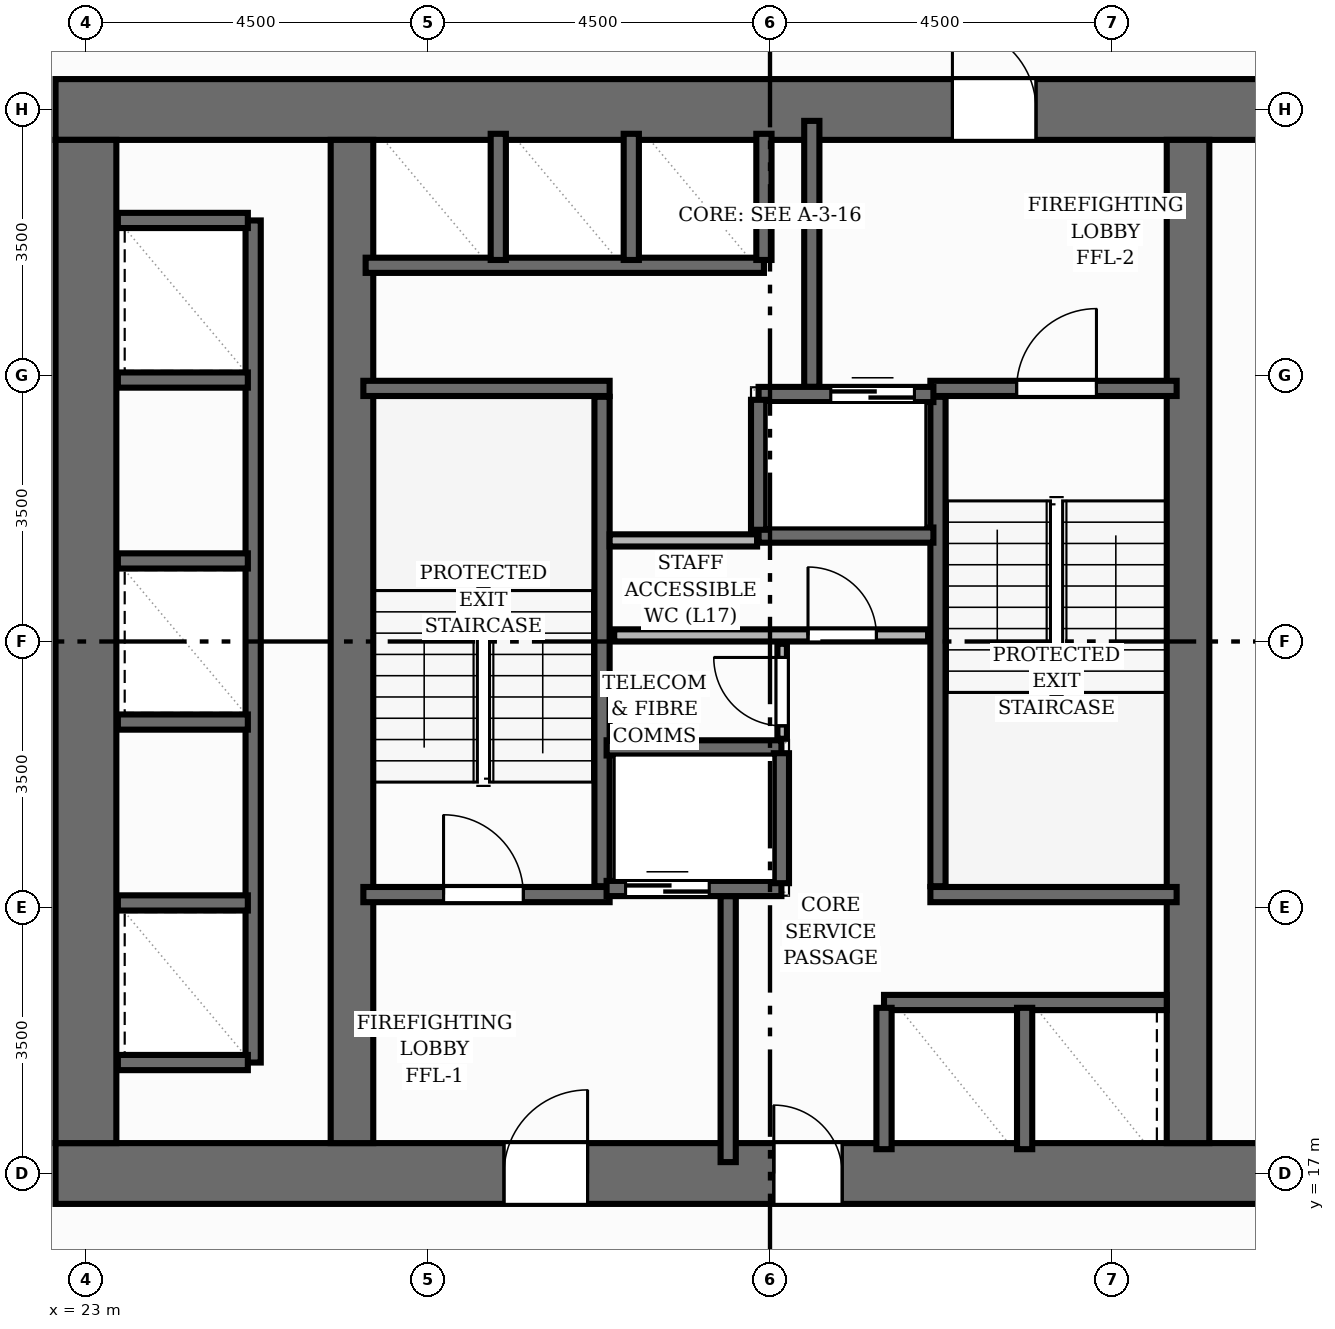
"""IFC4 building model, lengths in metres.
Left out: names, types, materials, properties, quantities, classifications, styles, units other than length and angle.
Written with IfcOpenShell. Run it as: python <this file> out.ifc"""

import sys

from ifc_helpers import new_model, si_unit, direction, frame, frame_2d, origin, place, context, subcontext, project, spatial, rectangle, extrude, element, fill, save


model = new_model("IFC4")
c1 = context("Model", 3, precision=1e-05, world=origin(), true_north=direction((0.0, 1.0)))
c2 = subcontext(c1, "Body", "Model", "MODEL_VIEW")
j1 = project(units=[si_unit("LENGTHUNIT", "METRE"), si_unit("PLANEANGLEUNIT", "RADIAN")], contexts=[c1])
p1 = place(None, origin())
s1 = spatial("IfcSite", under=j1, at=p1, CompositionType="ELEMENT")
p2 = place(p1, origin())
s2 = spatial("IfcBuilding", under=s1, at=p2, CompositionType="ELEMENT")
p3 = place(p2, frame((0.0, 0.0, 60.0)))
s3 = spatial("IfcBuildingStorey", under=s2, at=p3, CompositionType="ELEMENT", Elevation=60.0)
p4 = place(p3, frame((22.6, 17.0, 0.0), z_axis=(0.0, 0.0, 1.0), x_axis=(1.0, 0.0, 0.0)))
e1 = element("IfcWall", 1, at=p4, inside=s3, PredefinedType="SHEAR", context=c2, shape_type="SweptSolid", body=[
    extrude(rectangle(XDim=18.8, YDim=0.8, at=frame_2d((9.4, 0.0))), origin(), (0.0, 0.0, 1.0), 3.2),
])
p5 = place(p4, frame((5.9, 0.0, 0.0)))
e2 = element("IfcOpeningElement", 2, at=p5, cuts=e1, PredefinedType="OPENING", context=c2, shape_type="SweptSolid", body=[
    extrude(rectangle(XDim=1.1, YDim=2.15, at=frame_2d((0.55, 1.075))), frame((0.0, 0.41, 0.0), z_axis=(0.0, -1.0, 0.0), x_axis=(1.0, 0.0, 0.0)), (0.0, 0.0, 1.0), 0.82),
])
p6 = place(p4, frame((9.45, 0.0, 0.0)))
e3 = element("IfcOpeningElement", 3, at=p6, cuts=e1, PredefinedType="OPENING", context=c2, shape_type="SweptSolid", body=[
    extrude(rectangle(XDim=0.9, YDim=2.1, at=frame_2d((0.45, 1.05))), frame((0.0, 0.41, 0.0), z_axis=(0.0, -1.0, 0.0), x_axis=(1.0, 0.0, 0.0)), (0.0, 0.0, 1.0), 0.82),
])
p7 = place(p3, frame((22.6, 31.0, 0.0), z_axis=(0.0, 0.0, 1.0), x_axis=(1.0, 0.0, 0.0)))
e4 = element("IfcWall", 4, at=p7, inside=s3, PredefinedType="SHEAR", context=c2, shape_type="SweptSolid", body=[
    extrude(rectangle(XDim=18.8, YDim=0.8, at=frame_2d((9.4, 0.0))), origin(), (0.0, 0.0, 1.0), 3.2),
])
p8 = place(p7, frame((11.8, 0.0, 0.0)))
e5 = element("IfcOpeningElement", 5, at=p8, cuts=e4, PredefinedType="OPENING", context=c2, shape_type="SweptSolid", body=[
    extrude(rectangle(XDim=1.1, YDim=2.15, at=frame_2d((0.55, 1.075))), frame((0.0, 0.41, 0.0), z_axis=(0.0, -1.0, 0.0), x_axis=(1.0, 0.0, 0.0)), (0.0, 0.0, 1.0), 0.82),
])
p9 = place(p3, frame((23.0, 17.4, 0.0), z_axis=(0.0, 0.0, 1.0), x_axis=(0.0, 1.0, 0.0)))
e6 = element("IfcWall", 6, at=p9, inside=s3, PredefinedType="SHEAR", context=c2, shape_type="SweptSolid", body=[
    extrude(rectangle(XDim=13.2, YDim=0.8, at=frame_2d((6.6, 0.0))), origin(), (0.0, 0.0, 1.0), 3.2),
])
for number, where, z_axis, x_axis in (
    (7, (26.5, 17.4, 0.0), (0.0, 0.0, 1.0), (0.0, 1.0, 0.0)),
    (8, (37.5, 17.4, 0.0), (0.0, 0.0, 1.0), (0.0, 1.0, 0.0)),
):
    element("IfcWall", number, at=place(p3, frame(where, z_axis=z_axis, x_axis=x_axis)), inside=s3, PredefinedType="SHEAR", context=c2, shape_type="SweptSolid", body=[
        extrude(rectangle(XDim=13.2, YDim=0.56, at=frame_2d((6.6, 0.0))), origin(), (0.0, 0.0, 1.0), 3.2),
    ])
p10 = place(p3, frame((29.79, 20.78, 0.0), z_axis=(0.0, 0.0, 1.0), x_axis=(0.0, 1.0, 0.0)))
e9 = element("IfcWall", 9, at=p10, inside=s3, PredefinedType="SHEAR", context=c2, shape_type="SweptSolid", body=[
    extrude(rectangle(XDim=6.44, YDim=0.2, at=frame_2d((3.22, 0.0))), origin(), (0.0, 0.0, 1.0), 3.2),
])
p11 = place(p3, frame((26.65, 27.33, 0.0), z_axis=(0.0, 0.0, 1.0), x_axis=(1.0, 0.0, 0.0)))
e10 = element("IfcWall", 10, at=p11, inside=s3, PredefinedType="SHEAR", context=c2, shape_type="SweptSolid", body=[
    extrude(rectangle(XDim=3.24, YDim=0.2, at=frame_2d((1.62, 0.0))), origin(), (0.0, 0.0, 1.0), 3.2),
])
p12 = place(p3, frame((26.65, 20.67, 0.0), z_axis=(0.0, 0.0, 1.0), x_axis=(1.0, 0.0, 0.0)))
e11 = element("IfcWall", 11, at=p12, inside=s3, PredefinedType="SHEAR", context=c2, shape_type="SweptSolid", body=[
    extrude(rectangle(XDim=3.24, YDim=0.2, at=frame_2d((1.62, 0.0))), origin(), (0.0, 0.0, 1.0), 3.2),
])
p13 = place(p12, frame((1.055, 0.0, 0.0)))
e12 = element("IfcOpeningElement", 12, at=p13, cuts=e11, PredefinedType="OPENING", context=c2, shape_type="SweptSolid", body=[
    extrude(rectangle(XDim=1.05, YDim=2.15, at=frame_2d((0.525, 1.075))), frame((0.0, 0.11, 0.0), z_axis=(0.0, -1.0, 0.0), x_axis=(1.0, 0.0, 0.0)), (0.0, 0.0, 1.0), 0.22),
])
p14 = place(p3, frame((34.21, 20.78, 0.0), z_axis=(0.0, 0.0, 1.0), x_axis=(0.0, 1.0, 0.0)))
e13 = element("IfcWall", 13, at=p14, inside=s3, PredefinedType="SHEAR", context=c2, shape_type="SweptSolid", body=[
    extrude(rectangle(XDim=6.44, YDim=0.2, at=frame_2d((3.22, 0.0))), origin(), (0.0, 0.0, 1.0), 3.2),
])
p15 = place(p3, frame((34.11, 20.67, 0.0), z_axis=(0.0, 0.0, 1.0), x_axis=(1.0, 0.0, 0.0)))
e14 = element("IfcWall", 14, at=p15, inside=s3, PredefinedType="SHEAR", context=c2, shape_type="SweptSolid", body=[
    extrude(rectangle(XDim=3.24, YDim=0.2, at=frame_2d((1.62, 0.0))), origin(), (0.0, 0.0, 1.0), 3.2),
])
p16 = place(p3, frame((34.11, 27.33, 0.0), z_axis=(0.0, 0.0, 1.0), x_axis=(1.0, 0.0, 0.0)))
e15 = element("IfcWall", 15, at=p16, inside=s3, PredefinedType="SHEAR", context=c2, shape_type="SweptSolid", body=[
    extrude(rectangle(XDim=3.24, YDim=0.2, at=frame_2d((1.62, 0.0))), origin(), (0.0, 0.0, 1.0), 3.2),
])
p17 = place(p16, frame((1.135, 0.0, 0.0)))
e16 = element("IfcOpeningElement", 16, at=p17, cuts=e15, PredefinedType="OPENING", context=c2, shape_type="SweptSolid", body=[
    extrude(rectangle(XDim=1.05, YDim=2.15, at=frame_2d((0.525, 1.075))), frame((0.0, 0.11, 0.0), z_axis=(0.0, -1.0, 0.0), x_axis=(1.0, 0.0, 0.0)), (0.0, 0.0, 1.0), 0.22),
])
for number, where, z_axis, x_axis in (
    (17, (31.45, 17.15, 0.0), (0.0, 0.0, 1.0), (0.0, 1.0, 0.0)),
    (18, (32.55, 27.35, 0.0), (0.0, 0.0, 1.0), (0.0, 1.0, 0.0)),
):
    element("IfcWall", number, at=place(p3, frame(where, z_axis=z_axis, x_axis=x_axis)), inside=s3, PredefinedType="SHEAR", context=c2, shape_type="SweptSolid", body=[
        extrude(rectangle(XDim=3.5, YDim=0.2, at=frame_2d((1.75, 0.0))), origin(), (0.0, 0.0, 1.0), 3.2),
    ])
p18 = place(p3, frame((29.85, 20.75, 0.0), z_axis=(0.0, 0.0, 1.0), x_axis=(1.0, 0.0, 0.0)))
e19 = element("IfcWall", 19, at=p18, inside=s3, PredefinedType="SHEAR", context=c2, shape_type="SweptSolid", body=[
    extrude(rectangle(XDim=2.3, YDim=0.2, at=frame_2d((1.15, 0.0))), origin(), (0.0, 0.0, 1.0), 3.2),
])
p19 = place(p18, frame((0.25, 0.0, 0.0)))
e20 = element("IfcOpeningElement", 20, at=p19, cuts=e19, PredefinedType="OPENING", context=c2, shape_type="SweptSolid", body=[
    extrude(rectangle(XDim=1.1, YDim=2.15, at=frame_2d((0.55, 1.075))), frame((0.0, 0.11, 0.0), z_axis=(0.0, -1.0, 0.0), x_axis=(1.0, 0.0, 0.0)), (0.0, 0.0, 1.0), 0.22),
])
p20 = place(p3, frame((29.85, 22.6, 0.0), z_axis=(0.0, 0.0, 1.0), x_axis=(1.0, 0.0, 0.0)))
e21 = element("IfcWall", 21, at=p20, inside=s3, PredefinedType="SHEAR", context=c2, shape_type="SweptSolid", body=[
    extrude(rectangle(XDim=2.3, YDim=0.2, at=frame_2d((1.15, 0.0))), origin(), (0.0, 0.0, 1.0), 3.2),
])
p21 = place(p3, frame((32.15, 20.82, 0.0), z_axis=(0.0, 0.0, 1.0), x_axis=(0.0, 1.0, 0.0)))
e22 = element("IfcWall", 22, at=p21, inside=s3, PredefinedType="SHEAR", context=c2, shape_type="SweptSolid", body=[
    extrude(rectangle(XDim=1.71, YDim=0.2, at=frame_2d((0.855, 0.0))), origin(), (0.0, 0.0, 1.0), 3.2),
])
p22 = place(p3, frame((31.85, 27.25, 0.0), z_axis=(0.0, 0.0, 1.0), x_axis=(1.0, 0.0, 0.0)))
e23 = element("IfcWall", 23, at=p22, inside=s3, PredefinedType="SHEAR", context=c2, shape_type="SweptSolid", body=[
    extrude(rectangle(XDim=2.3, YDim=0.2, at=frame_2d((1.15, 0.0))), origin(), (0.0, 0.0, 1.0), 3.2),
])
p23 = place(p22, frame((0.95, 0.0, 0.0)))
e24 = element("IfcOpeningElement", 24, at=p23, cuts=e23, PredefinedType="OPENING", context=c2, shape_type="SweptSolid", body=[
    extrude(rectangle(XDim=1.1, YDim=2.15, at=frame_2d((0.55, 1.075))), frame((0.0, 0.11, 0.0), z_axis=(0.0, -1.0, 0.0), x_axis=(1.0, 0.0, 0.0)), (0.0, 0.0, 1.0), 0.22),
])
p24 = place(p3, frame((31.85, 25.4, 0.0), z_axis=(0.0, 0.0, 1.0), x_axis=(1.0, 0.0, 0.0)))
e25 = element("IfcWall", 25, at=p24, inside=s3, PredefinedType="SHEAR", context=c2, shape_type="SweptSolid", body=[
    extrude(rectangle(XDim=2.3, YDim=0.2, at=frame_2d((1.15, 0.0))), origin(), (0.0, 0.0, 1.0), 3.2),
])
p25 = place(p3, frame((31.85, 25.47, 0.0), z_axis=(0.0, 0.0, 1.0), x_axis=(0.0, 1.0, 0.0)))
e26 = element("IfcWall", 26, at=p25, inside=s3, PredefinedType="SHEAR", context=c2, shape_type="SweptSolid", body=[
    extrude(rectangle(XDim=1.71, YDim=0.2, at=frame_2d((0.855, 0.0))), origin(), (0.0, 0.0, 1.0), 3.2),
])
p26 = place(p3, frame((25.2, 18.46, 0.0), z_axis=(0.0, 0.0, 1.0), x_axis=(0.0, 1.0, 0.0)))
e27 = element("IfcWall", 27, at=p26, inside=s3, PredefinedType="SHEAR", context=c2, shape_type="SweptSolid", body=[
    extrude(rectangle(XDim=11.08, YDim=0.2, at=frame_2d((5.54, 0.0))), origin(), (0.0, 0.0, 1.0), 3.2),
])
for number, where, z_axis, x_axis in (
    (28, (23.42, 18.46, 0.0), (0.0, 0.0, 1.0), (1.0, 0.0, 0.0)),
    (29, (23.42, 29.54, 0.0), (0.0, 0.0, 1.0), (1.0, 0.0, 0.0)),
    (30, (23.42, 20.56, 0.0), (0.0, 0.0, 1.0), (1.0, 0.0, 0.0)),
    (31, (23.42, 22.94, 0.0), (0.0, 0.0, 1.0), (1.0, 0.0, 0.0)),
    (32, (23.42, 25.06, 0.0), (0.0, 0.0, 1.0), (1.0, 0.0, 0.0)),
    (33, (23.42, 27.44, 0.0), (0.0, 0.0, 1.0), (1.0, 0.0, 0.0)),
):
    element("IfcWall", number, at=place(p3, frame(where, z_axis=z_axis, x_axis=x_axis)), inside=s3, PredefinedType="SHEAR", context=c2, shape_type="SweptSolid", body=[
        extrude(rectangle(XDim=1.71, YDim=0.2, at=frame_2d((0.855, 0.0))), origin(), (0.0, 0.0, 1.0), 3.2),
    ])
p27 = place(p3, frame((26.68, 28.95, 0.0), z_axis=(0.0, 0.0, 1.0), x_axis=(1.0, 0.0, 0.0)))
e34 = element("IfcWall", 34, at=p27, inside=s3, PredefinedType="SHEAR", context=c2, shape_type="SweptSolid", body=[
    extrude(rectangle(XDim=5.24, YDim=0.2, at=frame_2d((2.62, 0.0))), origin(), (0.0, 0.0, 1.0), 3.2),
])
for number, where, z_axis, x_axis in (
    (35, (31.92, 29.02, 0.0), (0.0, 0.0, 1.0), (0.0, 1.0, 0.0)),
    (36, (28.425, 29.02, 0.0), (0.0, 0.0, 1.0), (0.0, 1.0, 0.0)),
    (37, (30.175, 29.02, 0.0), (0.0, 0.0, 1.0), (0.0, 1.0, 0.0)),
):
    element("IfcWall", number, at=place(p3, frame(where, z_axis=z_axis, x_axis=x_axis)), inside=s3, PredefinedType="SHEAR", context=c2, shape_type="SweptSolid", body=[
        extrude(rectangle(XDim=1.66, YDim=0.2, at=frame_2d((0.83, 0.0))), origin(), (0.0, 0.0, 1.0), 3.2),
    ])
p28 = place(p3, frame((33.5, 19.25, 0.0), z_axis=(0.0, 0.0, 1.0), x_axis=(1.0, 0.0, 0.0)))
e38 = element("IfcWall", 38, at=p28, inside=s3, PredefinedType="SHEAR", context=c2, shape_type="SweptSolid", body=[
    extrude(rectangle(XDim=3.72, YDim=0.2, at=frame_2d((1.86, 0.0))), origin(), (0.0, 0.0, 1.0), 3.2),
])
for number, where, z_axis, x_axis in (
    (39, (33.5, 17.32, 0.0), (0.0, 0.0, 1.0), (0.0, 1.0, 0.0)),
    (40, (35.35, 17.32, 0.0), (0.0, 0.0, 1.0), (0.0, 1.0, 0.0)),
):
    element("IfcWall", number, at=place(p3, frame(where, z_axis=z_axis, x_axis=x_axis)), inside=s3, PredefinedType="SHEAR", context=c2, shape_type="SweptSolid", body=[
        extrude(rectangle(XDim=1.86, YDim=0.2, at=frame_2d((0.93, 0.0))), origin(), (0.0, 0.0, 1.0), 3.2),
    ])
p29 = place(p3, frame((29.95, 24.08, 0.0), z_axis=(0.0, 0.0, 1.0), x_axis=(1.0, 0.0, 0.0)))
e41 = element("IfcWall", 41, at=p29, inside=s3, PredefinedType="PLUMBINGWALL", context=c2, shape_type="SweptSolid", body=[
    extrude(rectangle(XDim=4.13, YDim=0.16, at=frame_2d((2.065, 0.0))), origin(), (0.0, 0.0, 1.0), 2.955),
])
p30 = place(p29, frame((2.55, 0.0, 0.0)))
e42 = element("IfcOpeningElement", 42, at=p30, cuts=e41, PredefinedType="OPENING", context=c2, shape_type="SweptSolid", body=[
    extrude(rectangle(XDim=0.9, YDim=2.1, at=frame_2d((0.45, 1.05))), frame((0.0, 0.09, 0.0), z_axis=(0.0, -1.0, 0.0), x_axis=(1.0, 0.0, 0.0)), (0.0, 0.0, 1.0), 0.18),
])
p31 = place(p3, frame((32.16, 22.72, 0.0), z_axis=(0.0, 0.0, 1.0), x_axis=(0.0, 1.0, 0.0)))
e43 = element("IfcWall", 43, at=p31, inside=s3, PredefinedType="PARTITIONING", context=c2, shape_type="SweptSolid", body=[
    extrude(rectangle(XDim=1.25, YDim=0.125, at=frame_2d((0.625, 0.0))), origin(), (0.0, 0.0, 1.0), 2.955),
])
p32 = place(p31, frame((0.17, 0.0, 0.0)))
e44 = element("IfcOpeningElement", 44, at=p32, cuts=e43, PredefinedType="OPENING", context=c2, shape_type="SweptSolid", body=[
    extrude(rectangle(XDim=0.9, YDim=2.1, at=frame_2d((0.45, 1.05))), frame((0.0, 0.073, 0.0), z_axis=(0.0, -1.0, 0.0), x_axis=(1.0, 0.0, 0.0)), (0.0, 0.0, 1.0), 0.145),
])
p33 = place(p3, frame((29.89, 25.33, 0.0), z_axis=(0.0, 0.0, 1.0), x_axis=(1.0, 0.0, 0.0)))
e45 = element("IfcWall", 45, at=p33, inside=s3, PredefinedType="PLUMBINGWALL", context=c2, shape_type="SweptSolid", body=[
    extrude(rectangle(XDim=1.94, YDim=0.16, at=frame_2d((0.97, 0.0))), origin(), (0.0, 0.0, 1.0), 2.955),
])
p34 = place(p13, origin())
e46 = element("IfcDoor", 46, at=p34, inside=s3, OperationType="SINGLE_SWING_LEFT", PredefinedType="DOOR", context=c2, shape_type="SweptSolid", body=[
    extrude(rectangle(XDim=1.05, YDim=2.15, at=frame_2d((0.525, 1.075))), frame((0.0, 0.025, 0.0), z_axis=(0.0, -1.0, 0.0), x_axis=(1.0, 0.0, 0.0)), (0.0, 0.0, 1.0), 0.05),
])
fill(e12, e46)
p35 = place(p17, origin())
e47 = element("IfcDoor", 47, at=p35, inside=s3, OperationType="SINGLE_SWING_RIGHT", PredefinedType="DOOR", context=c2, shape_type="SweptSolid", body=[
    extrude(rectangle(XDim=1.05, YDim=2.15, at=frame_2d((0.525, 1.075))), frame((0.0, 0.025, 0.0), z_axis=(0.0, -1.0, 0.0), x_axis=(1.0, 0.0, 0.0)), (0.0, 0.0, 1.0), 0.05),
])
fill(e16, e47)
p36 = place(p5, origin())
e48 = element("IfcDoor", 48, at=p36, inside=s3, OperationType="SINGLE_SWING_RIGHT", PredefinedType="DOOR", context=c2, shape_type="SweptSolid", body=[
    extrude(rectangle(XDim=1.1, YDim=2.15, at=frame_2d((0.55, 1.075))), frame((0.0, 0.025, 0.0), z_axis=(0.0, -1.0, 0.0), x_axis=(1.0, 0.0, 0.0)), (0.0, 0.0, 1.0), 0.05),
])
fill(e2, e48)
p37 = place(p8, origin())
e49 = element("IfcDoor", 49, at=p37, inside=s3, OperationType="SINGLE_SWING_LEFT", PredefinedType="DOOR", context=c2, shape_type="SweptSolid", body=[
    extrude(rectangle(XDim=1.1, YDim=2.15, at=frame_2d((0.55, 1.075))), frame((0.0, 0.025, 0.0), z_axis=(0.0, -1.0, 0.0), x_axis=(1.0, 0.0, 0.0)), (0.0, 0.0, 1.0), 0.05),
])
fill(e5, e49)
p38 = place(p19, origin())
e50 = element("IfcDoor", 50, at=p38, inside=s3, OperationType="DOUBLE_DOOR_SLIDING", PredefinedType="DOOR", context=c2, shape_type="SweptSolid", body=[
    extrude(rectangle(XDim=1.1, YDim=2.15, at=frame_2d((0.55, 1.075))), frame((0.0, 0.025, 0.0), z_axis=(0.0, -1.0, 0.0), x_axis=(1.0, 0.0, 0.0)), (0.0, 0.0, 1.0), 0.05),
])
fill(e20, e50)
p39 = place(p23, origin())
e51 = element("IfcDoor", 51, at=p39, inside=s3, OperationType="DOUBLE_DOOR_SLIDING", PredefinedType="DOOR", context=c2, shape_type="SweptSolid", body=[
    extrude(rectangle(XDim=1.1, YDim=2.15, at=frame_2d((0.55, 1.075))), frame((0.0, 0.025, 0.0), z_axis=(0.0, -1.0, 0.0), x_axis=(1.0, 0.0, 0.0)), (0.0, 0.0, 1.0), 0.05),
])
fill(e24, e51)
p40 = place(p6, origin())
e52 = element("IfcDoor", 52, at=p40, inside=s3, OperationType="SINGLE_SWING_LEFT", PredefinedType="DOOR", context=c2, shape_type="SweptSolid", body=[
    extrude(rectangle(XDim=0.9, YDim=2.1, at=frame_2d((0.45, 1.05))), frame((0.0, 0.025, 0.0), z_axis=(0.0, -1.0, 0.0), x_axis=(1.0, 0.0, 0.0)), (0.0, 0.0, 1.0), 0.05),
])
fill(e3, e52)
p41 = place(p30, origin())
e53 = element("IfcDoor", 53, at=p41, inside=s3, OperationType="SINGLE_SWING_LEFT", PredefinedType="DOOR", context=c2, shape_type="SweptSolid", body=[
    extrude(rectangle(XDim=0.9, YDim=2.1, at=frame_2d((0.45, 1.05))), frame((0.0, 0.025, 0.0), z_axis=(0.0, -1.0, 0.0), x_axis=(1.0, 0.0, 0.0)), (0.0, 0.0, 1.0), 0.05),
])
fill(e42, e53)
p42 = place(p32, origin())
e54 = element("IfcDoor", 54, at=p42, inside=s3, OperationType="SINGLE_SWING_RIGHT", PredefinedType="DOOR", context=c2, shape_type="SweptSolid", body=[
    extrude(rectangle(XDim=0.9, YDim=2.1, at=frame_2d((0.45, 1.05))), frame((0.0, 0.025, 0.0), z_axis=(0.0, -1.0, 0.0), x_axis=(1.0, 0.0, 0.0)), (0.0, 0.0, 1.0), 0.05),
])
fill(e44, e54)
save(model, sys.argv[1])
